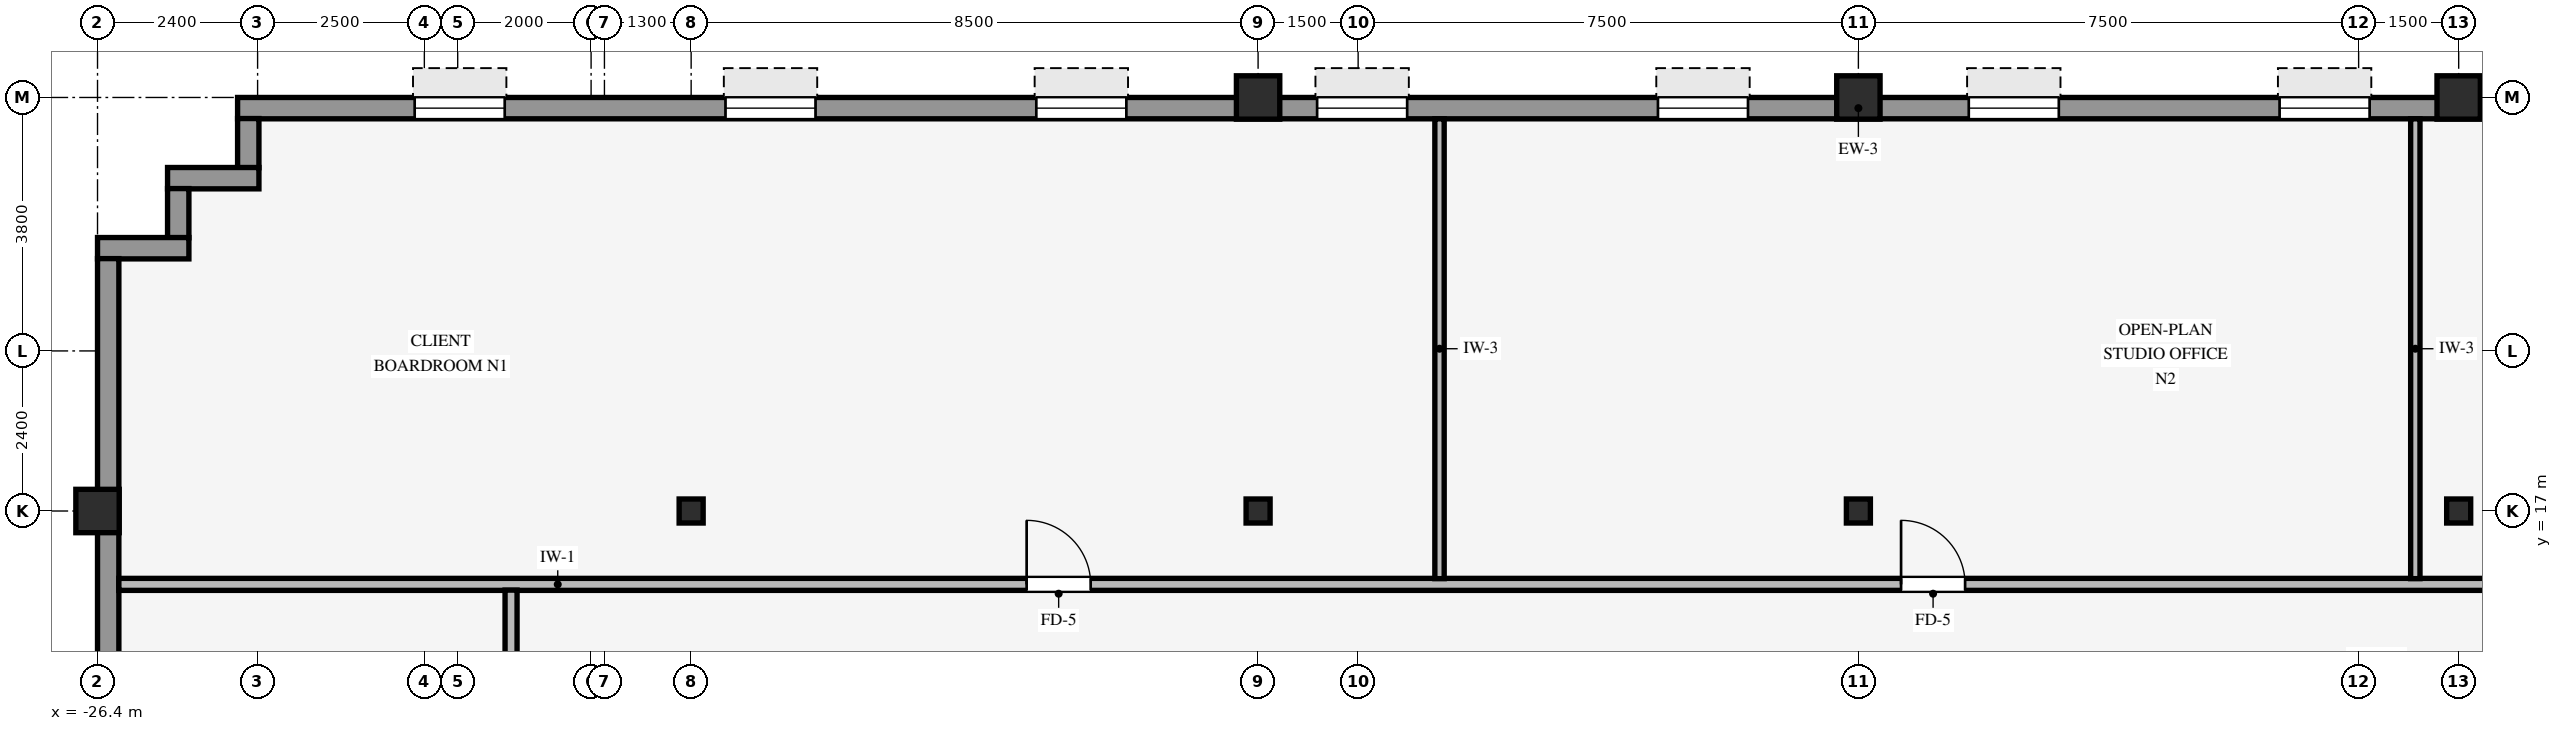
"""IFC4 building model, lengths in metres.
Left out: names, types, materials, properties, quantities, classifications, styles, units other than length and angle.
Written with IfcOpenShell. Run it as: python <this file> out.ifc"""

import sys

from ifc_helpers import new_model, si_unit, direction, frame, frame_2d, origin, origin_2d, place, context, subcontext, project, spatial, rectangle, hollow_rectangle, i_section, extrude, source, transform, mapped, element, fill, save


model = new_model("IFC4")
c1 = context("Model", 3, precision=1e-05, world=origin(), true_north=direction((0.0, 1.0)))
c2 = subcontext(c1, "Body", "Model", "MODEL_VIEW")
j1 = project(units=[si_unit("LENGTHUNIT", "METRE"), si_unit("PLANEANGLEUNIT", "RADIAN")], contexts=[c1])
p1 = place(None, origin())
s1 = spatial("IfcSite", under=j1, at=p1, CompositionType="ELEMENT")
p2 = place(p1, origin())
s2 = spatial("IfcBuilding", under=s1, at=p2, CompositionType="ELEMENT")
p3 = place(p2, frame((0.0, 0.0, 156.7)))
s3 = spatial("IfcBuildingStorey", under=s2, at=p3, CompositionType="ELEMENT", Elevation=156.7)
for number, where, z_axis, x_axis in (
    (1, (-26.4, 17.0, 0.0), (0.0, 0.0, 1.0), (1.0, 0.0, 0.0)),
    (2, (-9.0, 23.2, 0.0), (0.0, 0.0, 1.0), (1.0, 0.0, 0.0)),
    (3, (0.0, 23.2, 0.0), (0.0, 0.0, 1.0), (1.0, 0.0, 0.0)),
    (4, (9.0, 23.2, 0.0), (0.0, 0.0, 1.0), (1.0, 0.0, 0.0)),
):
    element("IfcColumn", number, at=place(p3, frame(where, z_axis=z_axis, x_axis=x_axis)), inside=s3, PredefinedType="COLUMN", context=c2, shape_type="SweptSolid", body=[
        extrude(hollow_rectangle(XDim=0.65, YDim=0.65, WallThickness=0.04, InnerFilletRadius=0.04, OuterFilletRadius=0.08, at=origin_2d()), origin(), (0.0, 0.0, 1.0), 3.37),
    ])
for number, where, z_axis, x_axis in (
    (5, (0.0, 17.0, 0.0), (0.0, 0.0, 1.0), (1.0, 0.0, 0.0)),
    (6, (-17.5, 17.0, 0.0), (0.0, 0.0, 1.0), (1.0, 0.0, 0.0)),
    (7, (-9.0, 17.0, 0.0), (0.0, 0.0, 1.0), (1.0, 0.0, 0.0)),
    (8, (9.0, 17.0, 0.0), (0.0, 0.0, 1.0), (1.0, 0.0, 0.0)),
):
    element("IfcColumn", number, at=place(p3, frame(where, z_axis=z_axis, x_axis=x_axis)), inside=s3, PredefinedType="COLUMN", context=c2, shape_type="SweptSolid", body=[
        extrude(i_section(OverallWidth=0.36, OverallDepth=0.36, WebThickness=0.021, FlangeThickness=0.021, FilletRadius=0.018, at=origin_2d()), origin(), (0.0, 0.0, 1.0), 3.37),
    ])
p4 = place(p3, frame((-24.3, 23.04, 0.0), z_axis=(0.0, 0.0, 1.0), x_axis=(1.0, 0.0, 0.0)))
e9 = element("IfcWall", 9, at=p4, inside=s3, PredefinedType="STANDARD", context=c2, shape_type="SweptSolid", body=[
    extrude(rectangle(XDim=48.6, YDim=0.32, at=frame_2d((24.3, 0.0))), origin(), (0.0, 0.0, 1.0), 2.705),
])
p5 = place(p4, frame((2.655, 0.0, 0.8)))
e10 = element("IfcOpeningElement", 10, at=p5, cuts=e9, PredefinedType="OPENING", context=c2, shape_type="SweptSolid", body=[
    extrude(rectangle(XDim=1.35, YDim=1.56, at=frame_2d((0.675, 0.78))), frame((0.0, 0.17, 0.0), z_axis=(0.0, -1.0, 0.0), x_axis=(1.0, 0.0, 0.0)), (0.0, 0.0, 1.0), 0.34),
])
p6 = place(p4, frame((7.315, 0.0, 0.8)))
e11 = element("IfcOpeningElement", 11, at=p6, cuts=e9, PredefinedType="OPENING", context=c2, shape_type="SweptSolid", body=[
    extrude(rectangle(XDim=1.35, YDim=1.56, at=frame_2d((0.675, 0.78))), frame((0.0, 0.17, 0.0), z_axis=(0.0, -1.0, 0.0), x_axis=(1.0, 0.0, 0.0)), (0.0, 0.0, 1.0), 0.34),
])
p7 = place(p4, frame((11.975, 0.0, 0.8)))
e12 = element("IfcOpeningElement", 12, at=p7, cuts=e9, PredefinedType="OPENING", context=c2, shape_type="SweptSolid", body=[
    extrude(rectangle(XDim=1.35, YDim=1.56, at=frame_2d((0.675, 0.78))), frame((0.0, 0.17, 0.0), z_axis=(0.0, -1.0, 0.0), x_axis=(1.0, 0.0, 0.0)), (0.0, 0.0, 1.0), 0.34),
])
p8 = place(p4, frame((16.185, 0.0, 0.8)))
e13 = element("IfcOpeningElement", 13, at=p8, cuts=e9, PredefinedType="OPENING", context=c2, shape_type="SweptSolid", body=[
    extrude(rectangle(XDim=1.35, YDim=1.56, at=frame_2d((0.675, 0.78))), frame((0.0, 0.17, 0.0), z_axis=(0.0, -1.0, 0.0), x_axis=(1.0, 0.0, 0.0)), (0.0, 0.0, 1.0), 0.34),
])
p9 = place(p4, frame((21.295, 0.0, 0.8)))
e14 = element("IfcOpeningElement", 14, at=p9, cuts=e9, PredefinedType="OPENING", context=c2, shape_type="SweptSolid", body=[
    extrude(rectangle(XDim=1.35, YDim=1.56, at=frame_2d((0.675, 0.78))), frame((0.0, 0.17, 0.0), z_axis=(0.0, -1.0, 0.0), x_axis=(1.0, 0.0, 0.0)), (0.0, 0.0, 1.0), 0.34),
])
p10 = place(p4, frame((25.955, 0.0, 0.8)))
e15 = element("IfcOpeningElement", 15, at=p10, cuts=e9, PredefinedType="OPENING", context=c2, shape_type="SweptSolid", body=[
    extrude(rectangle(XDim=1.35, YDim=1.56, at=frame_2d((0.675, 0.78))), frame((0.0, 0.17, 0.0), z_axis=(0.0, -1.0, 0.0), x_axis=(1.0, 0.0, 0.0)), (0.0, 0.0, 1.0), 0.34),
])
p11 = place(p4, frame((30.615, 0.0, 0.8)))
e16 = element("IfcOpeningElement", 16, at=p11, cuts=e9, PredefinedType="OPENING", context=c2, shape_type="SweptSolid", body=[
    extrude(rectangle(XDim=1.35, YDim=1.56, at=frame_2d((0.675, 0.78))), frame((0.0, 0.17, 0.0), z_axis=(0.0, -1.0, 0.0), x_axis=(1.0, 0.0, 0.0)), (0.0, 0.0, 1.0), 0.34),
])
p12 = place(p4, frame((35.275, 0.0, 0.8)))
e17 = element("IfcOpeningElement", 17, at=p12, cuts=e9, PredefinedType="OPENING", context=c2, shape_type="SweptSolid", body=[
    extrude(rectangle(XDim=1.35, YDim=1.56, at=frame_2d((0.675, 0.78))), frame((0.0, 0.17, 0.0), z_axis=(0.0, -1.0, 0.0), x_axis=(1.0, 0.0, 0.0)), (0.0, 0.0, 1.0), 0.34),
])
p13 = place(p4, frame((39.935, 0.0, 0.8)))
e18 = element("IfcOpeningElement", 18, at=p13, cuts=e9, PredefinedType="OPENING", context=c2, shape_type="SweptSolid", body=[
    extrude(rectangle(XDim=1.35, YDim=1.56, at=frame_2d((0.675, 0.78))), frame((0.0, 0.17, 0.0), z_axis=(0.0, -1.0, 0.0), x_axis=(1.0, 0.0, 0.0)), (0.0, 0.0, 1.0), 0.34),
])
p14 = place(p4, frame((44.595, 0.0, 0.8)))
e19 = element("IfcOpeningElement", 19, at=p14, cuts=e9, PredefinedType="OPENING", context=c2, shape_type="SweptSolid", body=[
    extrude(rectangle(XDim=1.35, YDim=1.56, at=frame_2d((0.675, 0.78))), frame((0.0, 0.17, 0.0), z_axis=(0.0, -1.0, 0.0), x_axis=(1.0, 0.0, 0.0)), (0.0, 0.0, 1.0), 0.34),
])
p15 = place(p3, frame((-24.14, 22.146, 0.0), z_axis=(0.0, 0.0, 1.0), x_axis=(0.0, 1.0, 0.0)))
e20 = element("IfcWall", 20, at=p15, inside=s3, PredefinedType="STANDARD", context=c2, shape_type="SweptSolid", body=[
    extrude(rectangle(XDim=0.738, YDim=0.32, at=frame_2d((0.369, 0.0))), origin(), (0.0, 0.0, 1.0), 3.36),
])
p16 = place(p3, frame((-25.35, 21.99, 0.0), z_axis=(0.0, 0.0, 1.0), x_axis=(1.0, 0.0, 0.0)))
e21 = element("IfcWall", 21, at=p16, inside=s3, PredefinedType="STANDARD", context=c2, shape_type="SweptSolid", body=[
    extrude(rectangle(XDim=1.37, YDim=0.32, at=frame_2d((0.685, 0.0))), origin(), (0.0, 0.0, 1.0), 3.36),
])
p17 = place(p3, frame((-25.19, 21.096, 0.0), z_axis=(0.0, 0.0, 1.0), x_axis=(0.0, 1.0, 0.0)))
e22 = element("IfcWall", 22, at=p17, inside=s3, PredefinedType="STANDARD", context=c2, shape_type="SweptSolid", body=[
    extrude(rectangle(XDim=0.738, YDim=0.32, at=frame_2d((0.369, 0.0))), origin(), (0.0, 0.0, 1.0), 3.36),
])
p18 = place(p3, frame((-26.4, 20.94, 0.0), z_axis=(0.0, 0.0, 1.0), x_axis=(1.0, 0.0, 0.0)))
e23 = element("IfcWall", 23, at=p18, inside=s3, PredefinedType="STANDARD", context=c2, shape_type="SweptSolid", body=[
    extrude(rectangle(XDim=1.37, YDim=0.32, at=frame_2d((0.685, 0.0))), origin(), (0.0, 0.0, 1.0), 3.36),
])
p19 = place(p3, frame((-26.24, -20.784, 0.0), z_axis=(0.0, 0.0, 1.0), x_axis=(0.0, 1.0, 0.0)))
e24 = element("IfcWall", 24, at=p19, inside=s3, PredefinedType="STANDARD", context=c2, shape_type="SweptSolid", body=[
    extrude(rectangle(XDim=41.568, YDim=0.32, at=frame_2d((20.784, 0.0))), origin(), (0.0, 0.0, 1.0), 2.705),
])
p20 = place(p19, frame((7.369, 0.0, 0.8)))
e25 = element("IfcOpeningElement", 25, at=p20, cuts=e24, PredefinedType="OPENING", context=c2, shape_type="SweptSolid", body=[
    extrude(rectangle(XDim=2.1, YDim=1.56, at=frame_2d((1.05, 0.78))), frame((0.0, 0.17, 0.0), z_axis=(0.0, -1.0, 0.0), x_axis=(1.0, 0.0, 0.0)), (0.0, 0.0, 1.0), 0.34),
])
p21 = place(p19, frame((12.315, 0.0, 0.8)))
e26 = element("IfcOpeningElement", 26, at=p21, cuts=e24, PredefinedType="OPENING", context=c2, shape_type="SweptSolid", body=[
    extrude(rectangle(XDim=2.1, YDim=1.56, at=frame_2d((1.05, 0.78))), frame((0.0, 0.17, 0.0), z_axis=(0.0, -1.0, 0.0), x_axis=(1.0, 0.0, 0.0)), (0.0, 0.0, 1.0), 0.34),
])
p22 = place(p19, frame((17.261, 0.0, 0.8)))
e27 = element("IfcOpeningElement", 27, at=p22, cuts=e24, PredefinedType="OPENING", context=c2, shape_type="SweptSolid", body=[
    extrude(rectangle(XDim=2.1, YDim=1.56, at=frame_2d((1.05, 0.78))), frame((0.0, 0.17, 0.0), z_axis=(0.0, -1.0, 0.0), x_axis=(1.0, 0.0, 0.0)), (0.0, 0.0, 1.0), 0.34),
])
p23 = place(p19, frame((22.207, 0.0, 0.8)))
e28 = element("IfcOpeningElement", 28, at=p23, cuts=e24, PredefinedType="OPENING", context=c2, shape_type="SweptSolid", body=[
    extrude(rectangle(XDim=2.1, YDim=1.56, at=frame_2d((1.05, 0.78))), frame((0.0, 0.17, 0.0), z_axis=(0.0, -1.0, 0.0), x_axis=(1.0, 0.0, 0.0)), (0.0, 0.0, 1.0), 0.34),
])
p24 = place(p19, frame((27.153, 0.0, 0.8)))
e29 = element("IfcOpeningElement", 29, at=p24, cuts=e24, PredefinedType="OPENING", context=c2, shape_type="SweptSolid", body=[
    extrude(rectangle(XDim=2.1, YDim=1.56, at=frame_2d((1.05, 0.78))), frame((0.0, 0.17, 0.0), z_axis=(0.0, -1.0, 0.0), x_axis=(1.0, 0.0, 0.0)), (0.0, 0.0, 1.0), 0.34),
])
p25 = place(p19, frame((32.099, 0.0, 0.8)))
e30 = element("IfcOpeningElement", 30, at=p25, cuts=e24, PredefinedType="OPENING", context=c2, shape_type="SweptSolid", body=[
    extrude(rectangle(XDim=2.1, YDim=1.56, at=frame_2d((1.05, 0.78))), frame((0.0, 0.17, 0.0), z_axis=(0.0, -1.0, 0.0), x_axis=(1.0, 0.0, 0.0)), (0.0, 0.0, 1.0), 0.34),
])
p26 = place(p3, frame((-26.08, 15.9, 0.0), z_axis=(0.0, 0.0, 1.0), x_axis=(1.0, 0.0, 0.0)))
e31 = element("IfcWall", 31, at=p26, inside=s3, PredefinedType="PARTITIONING", context=c2, shape_type="SweptSolid", body=[
    extrude(rectangle(XDim=52.16, YDim=0.18, at=frame_2d((26.08, 0.0))), origin(), (0.0, 0.0, 1.0), 3.36),
])
p27 = place(p26, frame((26.72, 0.0, 0.0)))
e32 = element("IfcOpeningElement", 32, at=p27, cuts=e31, PredefinedType="OPENING", context=c2, shape_type="SweptSolid", body=[
    extrude(rectangle(XDim=0.96, YDim=2.1, at=frame_2d((0.48, 1.05))), frame((0.0, 0.1, 0.0), z_axis=(0.0, -1.0, 0.0), x_axis=(1.0, 0.0, 0.0)), (0.0, 0.0, 1.0), 0.2),
])
p28 = place(p26, frame((40.5, 0.0, 0.0)))
e33 = element("IfcOpeningElement", 33, at=p28, cuts=e31, PredefinedType="OPENING", context=c2, shape_type="SweptSolid", body=[
    extrude(rectangle(XDim=0.96, YDim=2.1, at=frame_2d((0.48, 1.05))), frame((0.0, 0.1, 0.0), z_axis=(0.0, -1.0, 0.0), x_axis=(1.0, 0.0, 0.0)), (0.0, 0.0, 1.0), 0.2),
])
p29 = place(p26, frame((13.61, 0.0, 0.0)))
e34 = element("IfcOpeningElement", 34, at=p29, cuts=e31, PredefinedType="OPENING", context=c2, shape_type="SweptSolid", body=[
    extrude(rectangle(XDim=0.96, YDim=2.1, at=frame_2d((0.48, 1.05))), frame((0.0, 0.1, 0.0), z_axis=(0.0, -1.0, 0.0), x_axis=(1.0, 0.0, 0.0)), (0.0, 0.0, 1.0), 0.2),
])
p30 = place(p3, frame((-20.2, -15.814, 0.0), z_axis=(0.0, 0.0, 1.0), x_axis=(0.0, 1.0, 0.0)))
e35 = element("IfcWall", 35, at=p30, inside=s3, PredefinedType="PARTITIONING", context=c2, shape_type="SweptSolid", body=[
    extrude(rectangle(XDim=31.628, YDim=0.18, at=frame_2d((15.814, 0.0))), origin(), (0.0, 0.0, 1.0), 3.36),
])
p31 = place(p30, frame((15.334, 0.0, 0.0)))
e36 = element("IfcOpeningElement", 36, at=p31, cuts=e35, PredefinedType="OPENING", context=c2, shape_type="SweptSolid", body=[
    extrude(rectangle(XDim=0.96, YDim=2.1, at=frame_2d((0.48, 1.05))), frame((0.0, 0.1, 0.0), z_axis=(0.0, -1.0, 0.0), x_axis=(1.0, 0.0, 0.0)), (0.0, 0.0, 1.0), 0.2),
])
p32 = place(p30, frame((5.834, 0.0, 0.0)))
e37 = element("IfcOpeningElement", 37, at=p32, cuts=e35, PredefinedType="OPENING", context=c2, shape_type="SweptSolid", body=[
    extrude(rectangle(XDim=0.96, YDim=2.1, at=frame_2d((0.48, 1.05))), frame((0.0, 0.1, 0.0), z_axis=(0.0, -1.0, 0.0), x_axis=(1.0, 0.0, 0.0)), (0.0, 0.0, 1.0), 0.2),
])
p33 = place(p30, frame((24.834, 0.0, 0.0)))
e38 = element("IfcOpeningElement", 38, at=p33, cuts=e35, PredefinedType="OPENING", context=c2, shape_type="SweptSolid", body=[
    extrude(rectangle(XDim=0.96, YDim=2.1, at=frame_2d((0.48, 1.05))), frame((0.0, 0.1, 0.0), z_axis=(0.0, -1.0, 0.0), x_axis=(1.0, 0.0, 0.0)), (0.0, 0.0, 1.0), 0.2),
])
for number, where, z_axis, x_axis in (
    (39, (-6.28, 15.986, 0.0), (0.0, 0.0, 1.0), (0.0, 1.0, 0.0)),
    (40, (8.35, 15.986, 0.0), (0.0, 0.0, 1.0), (0.0, 1.0, 0.0)),
):
    element("IfcWall", number, at=place(p3, frame(where, z_axis=z_axis, x_axis=x_axis)), inside=s3, PredefinedType="PARTITIONING", context=c2, shape_type="SweptSolid", body=[
        extrude(rectangle(XDim=6.894, YDim=0.14, at=frame_2d((3.447, 0.0))), origin(), (0.0, 0.0, 1.0), 3.36),
    ])
m1 = source(origin(), c2, "Body", "SweptSolid", [
    extrude(rectangle(XDim=1.35, YDim=1.56, at=frame_2d((0.675, 0.78))), frame((0.0, 0.03, 0.0), z_axis=(0.0, -1.0, 0.0), x_axis=(1.0, 0.0, 0.0)), (0.0, 0.0, 1.0), 0.06),
])
p34 = place(p5, origin())
e41 = element("IfcWindow", 41, at=p34, inside=s3, PartitioningType="SINGLE_PANEL", PredefinedType="WINDOW", context=c2, shape_type="MappedRepresentation", body=[
    mapped(m1, transform((0.0, 0.0, 0.0), scale=1.0)),
])
fill(e10, e41)
p35 = place(p6, origin())
e42 = element("IfcWindow", 42, at=p35, inside=s3, PartitioningType="SINGLE_PANEL", PredefinedType="WINDOW", context=c2, shape_type="MappedRepresentation", body=[
    mapped(m1, transform((0.0, 0.0, 0.0), scale=1.0)),
])
fill(e11, e42)
p36 = place(p7, origin())
e43 = element("IfcWindow", 43, at=p36, inside=s3, PartitioningType="SINGLE_PANEL", PredefinedType="WINDOW", context=c2, shape_type="MappedRepresentation", body=[
    mapped(m1, transform((0.0, 0.0, 0.0), scale=1.0)),
])
fill(e12, e43)
p37 = place(p8, origin())
e44 = element("IfcWindow", 44, at=p37, inside=s3, PartitioningType="SINGLE_PANEL", PredefinedType="WINDOW", context=c2, shape_type="MappedRepresentation", body=[
    mapped(m1, transform((0.0, 0.0, 0.0), scale=1.0)),
])
fill(e13, e44)
p38 = place(p9, origin())
e45 = element("IfcWindow", 45, at=p38, inside=s3, PartitioningType="SINGLE_PANEL", PredefinedType="WINDOW", context=c2, shape_type="MappedRepresentation", body=[
    mapped(m1, transform((0.0, 0.0, 0.0), scale=1.0)),
])
fill(e14, e45)
p39 = place(p10, origin())
e46 = element("IfcWindow", 46, at=p39, inside=s3, PartitioningType="SINGLE_PANEL", PredefinedType="WINDOW", context=c2, shape_type="MappedRepresentation", body=[
    mapped(m1, transform((0.0, 0.0, 0.0), scale=1.0)),
])
fill(e15, e46)
p40 = place(p11, origin())
e47 = element("IfcWindow", 47, at=p40, inside=s3, PartitioningType="SINGLE_PANEL", PredefinedType="WINDOW", context=c2, shape_type="MappedRepresentation", body=[
    mapped(m1, transform((0.0, 0.0, 0.0), scale=1.0)),
])
fill(e16, e47)
m2 = source(origin(), c2, "Body", "SweptSolid", [
    extrude(rectangle(XDim=0.96, YDim=2.1, at=frame_2d((0.48, 1.05))), frame((0.0, 0.025, 0.0), z_axis=(0.0, -1.0, 0.0), x_axis=(1.0, 0.0, 0.0)), (0.0, 0.0, 1.0), 0.05),
])
p41 = place(p27, origin())
e48 = element("IfcDoor", 48, at=p41, inside=s3, OperationType="SINGLE_SWING_LEFT", PredefinedType="DOOR", context=c2, shape_type="MappedRepresentation", body=[
    mapped(m2, transform((0.0, 0.0, 0.0), scale=1.0)),
])
fill(e32, e48)
p42 = place(p29, origin())
e49 = element("IfcDoor", 49, at=p42, inside=s3, OperationType="SINGLE_SWING_LEFT", PredefinedType="DOOR", context=c2, shape_type="MappedRepresentation", body=[
    mapped(m2, transform((0.0, 0.0, 0.0), scale=1.0)),
])
fill(e34, e49)
save(model, sys.argv[1])
